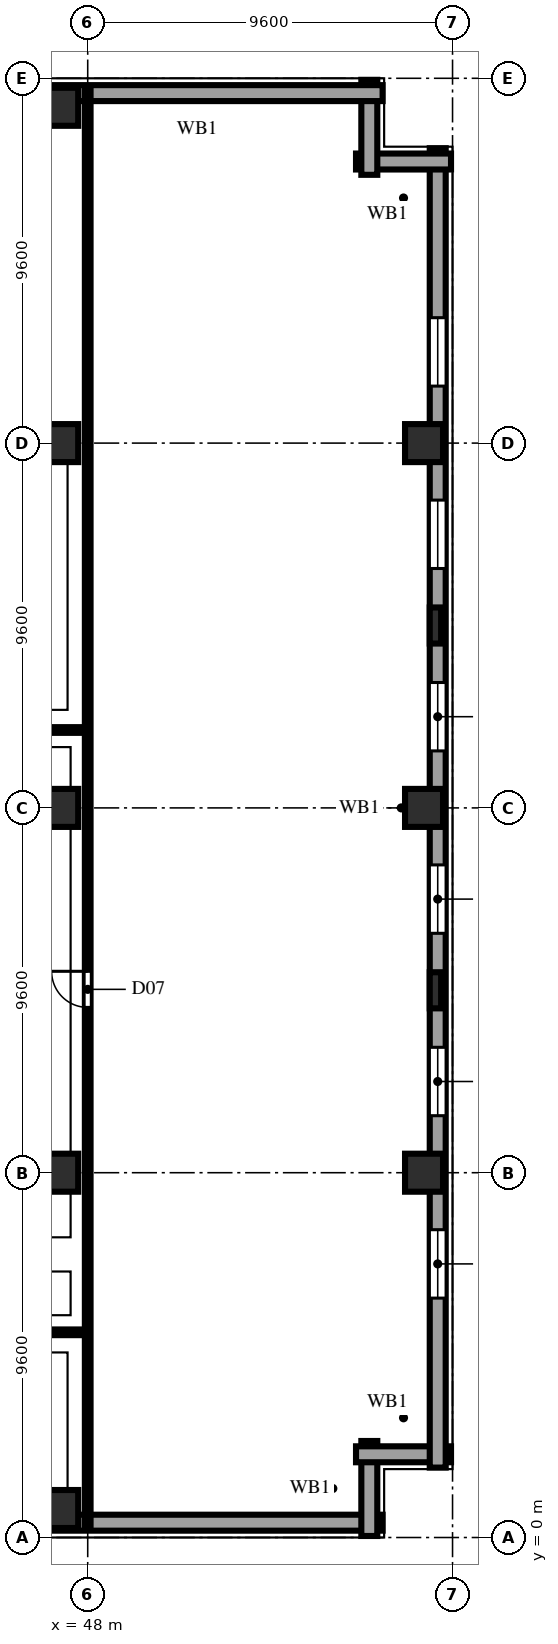
"""IFC4 building model, lengths in metres.
Left out: names, types, materials, properties, quantities, classifications, styles, units other than length and angle.
Written with IfcOpenShell. Run it as: python <this file> out.ifc"""

import sys

from ifc_helpers import new_model, si_unit, direction, frame, frame_2d, origin, origin_2d, place, context, subcontext, project, spatial, rectangle, extrude, element, fill, save


model = new_model("IFC4")
c1 = context("Model", 3, precision=1e-05, world=origin(), true_north=direction((0.0, 1.0)))
c2 = subcontext(c1, "Body", "Model", "MODEL_VIEW")
j1 = project(units=[si_unit("LENGTHUNIT", "METRE"), si_unit("PLANEANGLEUNIT", "RADIAN")], contexts=[c1])
p1 = place(None, origin())
s1 = spatial("IfcSite", under=j1, at=p1, CompositionType="ELEMENT")
p2 = place(p1, origin())
s2 = spatial("IfcBuilding", under=s1, at=p2, CompositionType="ELEMENT")
p3 = place(p2, frame((0.0, 0.0, 112.8)))
s3 = spatial("IfcBuildingStorey", under=s2, at=p3, CompositionType="ELEMENT", Elevation=112.8)
for number, where, z_axis, x_axis in (
    (1, (47.25, 0.75, 0.0), (0.0, 0.0, 1.0), (1.0, 0.0, 0.0)),
    (2, (47.25, 9.6, 0.0), (0.0, 0.0, 1.0), (1.0, 0.0, 0.0)),
    (3, (47.25, 19.2, 0.0), (0.0, 0.0, 1.0), (1.0, 0.0, 0.0)),
    (4, (47.25, 28.8, 0.0), (0.0, 0.0, 1.0), (1.0, 0.0, 0.0)),
    (5, (47.25, 37.65, 0.0), (0.0, 0.0, 1.0), (1.0, 0.0, 0.0)),
    (6, (56.85, 9.6, 0.0), (0.0, 0.0, 1.0), (1.0, 0.0, 0.0)),
    (7, (56.85, 19.2, 0.0), (0.0, 0.0, 1.0), (1.0, 0.0, 0.0)),
    (8, (56.85, 28.8, 0.0), (0.0, 0.0, 1.0), (1.0, 0.0, 0.0)),
):
    element("IfcColumn", number, at=place(p3, frame(where, z_axis=z_axis, x_axis=x_axis)), inside=s3, PredefinedType="COLUMN", context=c2, shape_type="SweptSolid", body=[
        extrude(rectangle(XDim=1.0, YDim=1.0, at=origin_2d()), origin(), (0.0, 0.0, 1.0), 3.8),
    ])
for number, where, z_axis, x_axis in (
    (9, (57.15, 14.4, 0.0), (0.0, 0.0, 1.0), (0.0, 1.0, 0.0)),
    (10, (57.15, 24.0, 0.0), (0.0, 0.0, 1.0), (0.0, 1.0, 0.0)),
):
    element("IfcColumn", number, at=place(p3, frame(where, z_axis=z_axis, x_axis=x_axis)), inside=s3, PredefinedType="PILASTER", context=c2, shape_type="SweptSolid", body=[
        extrude(rectangle(XDim=0.95, YDim=0.3, at=origin_2d()), origin(), (0.0, 0.0, 1.0), 3.8),
    ])
p4 = place(p3, frame((1.84, 0.39, 0.0), z_axis=(0.0, 0.0, 1.0), x_axis=(1.0, 0.0, 0.0)))
e11 = element("IfcWall", 11, at=p4, inside=s3, PredefinedType="SOLIDWALL", context=c2, shape_type="SweptSolid", body=[
    extrude(rectangle(XDim=53.92, YDim=0.42, at=frame_2d((26.96, 0.0))), origin(), (0.0, 0.0, 1.0), 3.54),
])
p5 = place(p4, frame((3.86, 0.0, 0.75)))
e12 = element("IfcOpeningElement", 12, at=p5, cuts=e11, PredefinedType="OPENING", context=c2, shape_type="SweptSolid", body=[
    extrude(rectangle(XDim=3.0, YDim=1.9, at=frame_2d((1.5, 0.95))), frame((0.0, 0.222, 0.0), z_axis=(0.0, -1.0, 0.0), x_axis=(1.0, 0.0, 0.0)), (0.0, 0.0, 1.0), 0.444),
])
p6 = place(p4, frame((8.66, 0.0, 0.75)))
e13 = element("IfcOpeningElement", 13, at=p6, cuts=e11, PredefinedType="OPENING", context=c2, shape_type="SweptSolid", body=[
    extrude(rectangle(XDim=3.0, YDim=1.9, at=frame_2d((1.5, 0.95))), frame((0.0, 0.222, 0.0), z_axis=(0.0, -1.0, 0.0), x_axis=(1.0, 0.0, 0.0)), (0.0, 0.0, 1.0), 0.444),
])
p7 = place(p4, frame((13.46, 0.0, 0.75)))
e14 = element("IfcOpeningElement", 14, at=p7, cuts=e11, PredefinedType="OPENING", context=c2, shape_type="SweptSolid", body=[
    extrude(rectangle(XDim=3.0, YDim=1.9, at=frame_2d((1.5, 0.95))), frame((0.0, 0.222, 0.0), z_axis=(0.0, -1.0, 0.0), x_axis=(1.0, 0.0, 0.0)), (0.0, 0.0, 1.0), 0.444),
])
p8 = place(p4, frame((18.26, 0.0, 0.75)))
e15 = element("IfcOpeningElement", 15, at=p8, cuts=e11, PredefinedType="OPENING", context=c2, shape_type="SweptSolid", body=[
    extrude(rectangle(XDim=3.0, YDim=1.9, at=frame_2d((1.5, 0.95))), frame((0.0, 0.222, 0.0), z_axis=(0.0, -1.0, 0.0), x_axis=(1.0, 0.0, 0.0)), (0.0, 0.0, 1.0), 0.444),
])
for number, where, z_axis, x_axis in (
    (16, (55.41, 0.04, 0.0), (0.0, 0.0, 1.0), (0.0, 1.0, 0.0)),
    (17, (55.06, 2.19, 0.0), (0.0, 0.0, 1.0), (1.0, 0.0, 0.0)),
):
    element("IfcWall", number, at=place(p3, frame(where, z_axis=z_axis, x_axis=x_axis)), inside=s3, PredefinedType="SOLIDWALL", context=c2, shape_type="SweptSolid", body=[
        extrude(rectangle(XDim=2.5, YDim=0.42, at=frame_2d((1.25, 0.0))), origin(), (0.0, 0.0, 1.0), 3.54),
    ])
p9 = place(p3, frame((57.21, 1.84, 0.0), z_axis=(0.0, 0.0, 1.0), x_axis=(0.0, 1.0, 0.0)))
e18 = element("IfcWall", 18, at=p9, inside=s3, PredefinedType="SOLIDWALL", context=c2, shape_type="SweptSolid", body=[
    extrude(rectangle(XDim=34.72, YDim=0.42, at=frame_2d((17.36, 0.0))), origin(), (0.0, 0.0, 1.0), 3.54),
])
p10 = place(p9, frame((4.46, 0.0, 0.85)))
e19 = element("IfcOpeningElement", 19, at=p10, cuts=e18, PredefinedType="OPENING", context=c2, shape_type="SweptSolid", body=[
    extrude(rectangle(XDim=1.8, YDim=1.85, at=frame_2d((0.9, 0.925))), frame((0.0, 0.222, 0.0), z_axis=(0.0, -1.0, 0.0), x_axis=(1.0, 0.0, 0.0)), (0.0, 0.0, 1.0), 0.444),
])
p11 = place(p9, frame((9.26, 0.0, 0.85)))
e20 = element("IfcOpeningElement", 20, at=p11, cuts=e18, PredefinedType="OPENING", context=c2, shape_type="SweptSolid", body=[
    extrude(rectangle(XDim=1.8, YDim=1.85, at=frame_2d((0.9, 0.925))), frame((0.0, 0.222, 0.0), z_axis=(0.0, -1.0, 0.0), x_axis=(1.0, 0.0, 0.0)), (0.0, 0.0, 1.0), 0.444),
])
p12 = place(p9, frame((14.06, 0.0, 0.85)))
e21 = element("IfcOpeningElement", 21, at=p12, cuts=e18, PredefinedType="OPENING", context=c2, shape_type="SweptSolid", body=[
    extrude(rectangle(XDim=1.8, YDim=1.85, at=frame_2d((0.9, 0.925))), frame((0.0, 0.222, 0.0), z_axis=(0.0, -1.0, 0.0), x_axis=(1.0, 0.0, 0.0)), (0.0, 0.0, 1.0), 0.444),
])
p13 = place(p9, frame((18.86, 0.0, 0.85)))
e22 = element("IfcOpeningElement", 22, at=p13, cuts=e18, PredefinedType="OPENING", context=c2, shape_type="SweptSolid", body=[
    extrude(rectangle(XDim=1.8, YDim=1.85, at=frame_2d((0.9, 0.925))), frame((0.0, 0.222, 0.0), z_axis=(0.0, -1.0, 0.0), x_axis=(1.0, 0.0, 0.0)), (0.0, 0.0, 1.0), 0.444),
])
p14 = place(p9, frame((23.66, 0.0, 0.85)))
e23 = element("IfcOpeningElement", 23, at=p14, cuts=e18, PredefinedType="OPENING", context=c2, shape_type="SweptSolid", body=[
    extrude(rectangle(XDim=1.8, YDim=1.85, at=frame_2d((0.9, 0.925))), frame((0.0, 0.222, 0.0), z_axis=(0.0, -1.0, 0.0), x_axis=(1.0, 0.0, 0.0)), (0.0, 0.0, 1.0), 0.444),
])
p15 = place(p9, frame((28.46, 0.0, 0.85)))
e24 = element("IfcOpeningElement", 24, at=p15, cuts=e18, PredefinedType="OPENING", context=c2, shape_type="SweptSolid", body=[
    extrude(rectangle(XDim=1.8, YDim=1.85, at=frame_2d((0.9, 0.925))), frame((0.0, 0.222, 0.0), z_axis=(0.0, -1.0, 0.0), x_axis=(1.0, 0.0, 0.0)), (0.0, 0.0, 1.0), 0.444),
])
for number, where, z_axis, x_axis in (
    (25, (57.56, 36.21, 0.0), (0.0, 0.0, 1.0), (-1.0, 0.0, 0.0)),
    (26, (55.41, 35.86, 0.0), (0.0, 0.0, 1.0), (0.0, 1.0, 0.0)),
):
    element("IfcWall", number, at=place(p3, frame(where, z_axis=z_axis, x_axis=x_axis)), inside=s3, PredefinedType="SOLIDWALL", context=c2, shape_type="SweptSolid", body=[
        extrude(rectangle(XDim=2.5, YDim=0.42, at=frame_2d((1.25, 0.0))), origin(), (0.0, 0.0, 1.0), 3.54),
    ])
p16 = place(p3, frame((55.76, 38.01, 0.0), z_axis=(0.0, 0.0, 1.0), x_axis=(-1.0, 0.0, 0.0)))
e27 = element("IfcWall", 27, at=p16, inside=s3, PredefinedType="SOLIDWALL", context=c2, shape_type="SweptSolid", body=[
    extrude(rectangle(XDim=9.76, YDim=0.42, at=frame_2d((4.88, 0.0))), origin(), (0.0, 0.0, 1.0), 3.54),
])
p17 = place(p3, frame((0.22, 5.4, 0.0), z_axis=(0.0, 0.0, 1.0), x_axis=(1.0, 0.0, 0.0)))
e28 = element("IfcWall", 28, at=p17, inside=s3, PredefinedType="PARTITIONING", context=c2, shape_type="SweptSolid", body=[
    extrude(rectangle(XDim=47.78, YDim=0.15, at=frame_2d((23.89, 0.0))), origin(), (0.0, 0.0, 1.0), 3.54),
])
p18 = place(p17, frame((12.43, 0.0, 0.0)))
e29 = element("IfcOpeningElement", 29, at=p18, cuts=e28, PredefinedType="OPENING", context=c2, shape_type="SweptSolid", body=[
    extrude(rectangle(XDim=1.2, YDim=2.2, at=frame_2d((0.6, 1.1))), frame((0.0, 0.087, 0.0), z_axis=(0.0, -1.0, 0.0), x_axis=(1.0, 0.0, 0.0)), (0.0, 0.0, 1.0), 0.174),
])
p19 = place(p17, frame((23.23, 0.0, 0.0)))
e30 = element("IfcOpeningElement", 30, at=p19, cuts=e28, PredefinedType="OPENING", context=c2, shape_type="SweptSolid", body=[
    extrude(rectangle(XDim=1.2, YDim=2.2, at=frame_2d((0.6, 1.1))), frame((0.0, 0.087, 0.0), z_axis=(0.0, -1.0, 0.0), x_axis=(1.0, 0.0, 0.0)), (0.0, 0.0, 1.0), 0.174),
])
p20 = place(p17, frame((31.98, 0.0, 0.0)))
e31 = element("IfcOpeningElement", 31, at=p20, cuts=e28, PredefinedType="OPENING", context=c2, shape_type="SweptSolid", body=[
    extrude(rectangle(XDim=2.0, YDim=2.3, at=frame_2d((1.0, 1.15))), frame((0.0, 0.087, 0.0), z_axis=(0.0, -1.0, 0.0), x_axis=(1.0, 0.0, 0.0)), (0.0, 0.0, 1.0), 0.174),
])
p21 = place(p17, frame((41.73, 0.0, 0.0)))
e32 = element("IfcOpeningElement", 32, at=p21, cuts=e28, PredefinedType="OPENING", context=c2, shape_type="SweptSolid", body=[
    extrude(rectangle(XDim=1.2, YDim=2.2, at=frame_2d((0.6, 1.1))), frame((0.0, 0.087, 0.0), z_axis=(0.0, -1.0, 0.0), x_axis=(1.0, 0.0, 0.0)), (0.0, 0.0, 1.0), 0.174),
])
p22 = place(p3, frame((48.0, 0.22, 0.0), z_axis=(0.0, 0.0, 1.0), x_axis=(0.0, 1.0, 0.0)))
e33 = element("IfcWall", 33, at=p22, inside=s3, PredefinedType="PARTITIONING", context=c2, shape_type="SweptSolid", body=[
    extrude(rectangle(XDim=37.96, YDim=0.15, at=frame_2d((18.98, 0.0))), origin(), (0.0, 0.0, 1.0), 3.54),
])
p23 = place(p22, frame((13.73, 0.0, 0.0)))
e34 = element("IfcOpeningElement", 34, at=p23, cuts=e33, PredefinedType="OPENING", context=c2, shape_type="SweptSolid", body=[
    extrude(rectangle(XDim=0.95, YDim=2.15, at=frame_2d((0.475, 1.075))), frame((0.0, 0.087, 0.0), z_axis=(0.0, -1.0, 0.0), x_axis=(1.0, 0.0, 0.0)), (0.0, 0.0, 1.0), 0.174),
])
p24 = place(p3, frame((38.4, 21.25, 0.0), z_axis=(0.0, 0.0, 1.0), x_axis=(1.0, 0.0, 0.0)))
e35 = element("IfcWall", 35, at=p24, inside=s3, PredefinedType="PARTITIONING", context=c2, shape_type="SweptSolid", body=[
    extrude(rectangle(XDim=9.52, YDim=0.15, at=frame_2d((4.76, 0.0))), origin(), (0.0, 0.0, 1.0), 3.54),
])
p25 = place(p24, frame((3.6, 0.0, 0.0)))
e36 = element("IfcOpeningElement", 36, at=p25, cuts=e35, PredefinedType="OPENING", context=c2, shape_type="SweptSolid", body=[
    extrude(rectangle(XDim=1.2, YDim=2.2, at=frame_2d((0.6, 1.1))), frame((0.0, 0.087, 0.0), z_axis=(0.0, -1.0, 0.0), x_axis=(1.0, 0.0, 0.0)), (0.0, 0.0, 1.0), 0.174),
])
p26 = place(p10, origin())
e37 = element("IfcWindow", 37, at=p26, inside=s3, PartitioningType="DOUBLE_PANEL_VERTICAL", PredefinedType="WINDOW", context=c2, shape_type="SweptSolid", body=[
    extrude(rectangle(XDim=1.8, YDim=1.85, at=frame_2d((0.9, 0.925))), frame((0.0, 0.11, 0.0), z_axis=(0.0, -1.0, 0.0), x_axis=(1.0, 0.0, 0.0)), (0.0, 0.0, 1.0), 0.06),
])
fill(e19, e37)
p27 = place(p11, origin())
e38 = element("IfcWindow", 38, at=p27, inside=s3, PartitioningType="DOUBLE_PANEL_VERTICAL", PredefinedType="WINDOW", context=c2, shape_type="SweptSolid", body=[
    extrude(rectangle(XDim=1.8, YDim=1.85, at=frame_2d((0.9, 0.925))), frame((0.0, 0.11, 0.0), z_axis=(0.0, -1.0, 0.0), x_axis=(1.0, 0.0, 0.0)), (0.0, 0.0, 1.0), 0.06),
])
fill(e20, e38)
p28 = place(p12, origin())
e39 = element("IfcWindow", 39, at=p28, inside=s3, PartitioningType="DOUBLE_PANEL_VERTICAL", PredefinedType="WINDOW", context=c2, shape_type="SweptSolid", body=[
    extrude(rectangle(XDim=1.8, YDim=1.85, at=frame_2d((0.9, 0.925))), frame((0.0, 0.11, 0.0), z_axis=(0.0, -1.0, 0.0), x_axis=(1.0, 0.0, 0.0)), (0.0, 0.0, 1.0), 0.06),
])
fill(e21, e39)
p29 = place(p13, origin())
e40 = element("IfcWindow", 40, at=p29, inside=s3, PartitioningType="DOUBLE_PANEL_VERTICAL", PredefinedType="WINDOW", context=c2, shape_type="SweptSolid", body=[
    extrude(rectangle(XDim=1.8, YDim=1.85, at=frame_2d((0.9, 0.925))), frame((0.0, 0.11, 0.0), z_axis=(0.0, -1.0, 0.0), x_axis=(1.0, 0.0, 0.0)), (0.0, 0.0, 1.0), 0.06),
])
fill(e22, e40)
p30 = place(p14, origin())
e41 = element("IfcWindow", 41, at=p30, inside=s3, PartitioningType="DOUBLE_PANEL_VERTICAL", PredefinedType="WINDOW", context=c2, shape_type="SweptSolid", body=[
    extrude(rectangle(XDim=1.8, YDim=1.85, at=frame_2d((0.9, 0.925))), frame((0.0, 0.11, 0.0), z_axis=(0.0, -1.0, 0.0), x_axis=(1.0, 0.0, 0.0)), (0.0, 0.0, 1.0), 0.06),
])
fill(e23, e41)
p31 = place(p15, origin())
e42 = element("IfcWindow", 42, at=p31, inside=s3, PartitioningType="DOUBLE_PANEL_VERTICAL", PredefinedType="WINDOW", context=c2, shape_type="SweptSolid", body=[
    extrude(rectangle(XDim=1.8, YDim=1.85, at=frame_2d((0.9, 0.925))), frame((0.0, 0.11, 0.0), z_axis=(0.0, -1.0, 0.0), x_axis=(1.0, 0.0, 0.0)), (0.0, 0.0, 1.0), 0.06),
])
fill(e24, e42)
p32 = place(p23, origin())
e43 = element("IfcDoor", 43, at=p32, inside=s3, OperationType="SINGLE_SWING_RIGHT", PredefinedType="DOOR", context=c2, shape_type="SweptSolid", body=[
    extrude(rectangle(XDim=0.95, YDim=2.15, at=frame_2d((0.475, 1.075))), frame((0.0, 0.025, 0.0), z_axis=(0.0, -1.0, 0.0), x_axis=(1.0, 0.0, 0.0)), (0.0, 0.0, 1.0), 0.05),
])
fill(e34, e43)
save(model, sys.argv[1])
